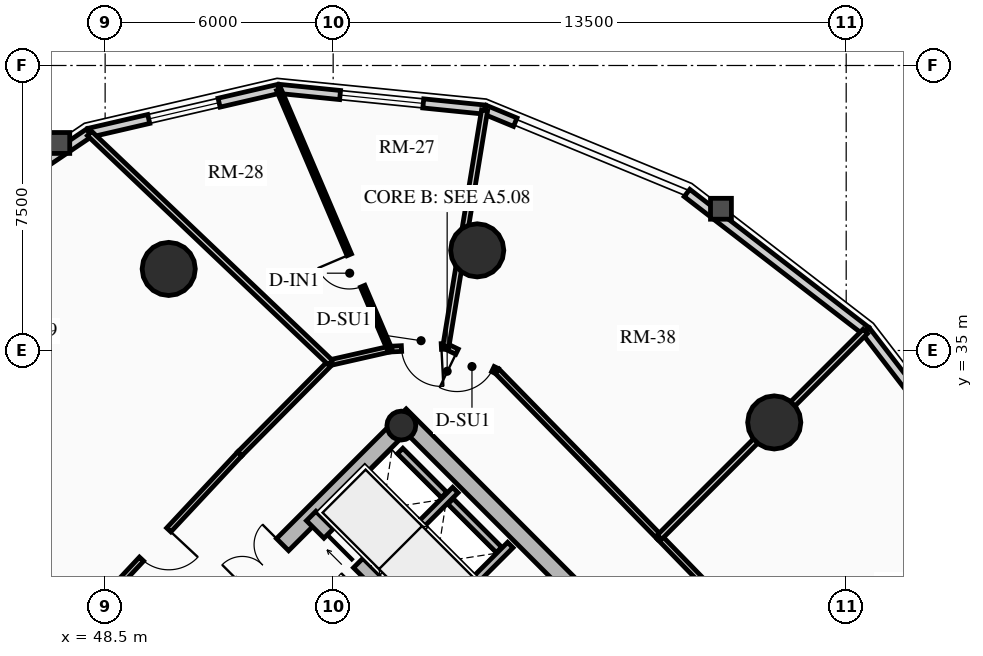
"""IFC4 building model, lengths in metres.
Left out: names, types, materials, properties, quantities, classifications, styles, units other than length and angle.
Written with IfcOpenShell. Run it as: python <this file> out.ifc"""

import sys

from ifc_helpers import new_model, si_unit, direction, frame, frame_2d, origin, origin_2d, place, context, subcontext, project, spatial, rectangle, circle, hollow_circle, extrude, source, transform, mapped, element, fill, save


model = new_model("IFC4")
c1 = context("Model", 3, precision=1e-05, world=origin(), true_north=direction((0.0, 1.0)))
c2 = subcontext(c1, "Body", "Model", "MODEL_VIEW")
j1 = project(units=[si_unit("LENGTHUNIT", "METRE"), si_unit("PLANEANGLEUNIT", "RADIAN")], contexts=[c1])
p1 = place(None, origin())
s1 = spatial("IfcSite", under=j1, at=p1, CompositionType="ELEMENT")
p2 = place(p1, origin())
s2 = spatial("IfcBuilding", under=s1, at=p2, CompositionType="ELEMENT")
p3 = place(p2, frame((0.0, 0.0, 81.79)))
s3 = spatial("IfcBuildingStorey", under=s2, at=p3, CompositionType="ELEMENT", Elevation=81.79)
p4 = place(p3, frame((66.303, 23.263, 0.0), z_axis=(0.0, 0.0, 1.0), x_axis=(-0.707106781187, 0.707106781187, 0.0)))
e1 = element("IfcWall", 1, at=p4, inside=s3, PredefinedType="SHEAR", context=c2, shape_type="SweptSolid", body=[
    extrude(rectangle(XDim=14.2, YDim=0.45, at=frame_2d((7.1, 0.0))), origin(), (0.0, 0.0, 1.0), 2.91),
])
p5 = place(p3, frame((48.856, 25.578, 0.0), z_axis=(0.0, 0.0, 1.0), x_axis=(0.707106781187, 0.707106781187, 0.0)))
e2 = element("IfcWall", 2, at=p5, inside=s3, PredefinedType="SHEAR", context=c2, shape_type="SweptSolid", body=[
    extrude(rectangle(XDim=10.7, YDim=0.45, at=frame_2d((5.35, 0.0))), origin(), (0.0, 0.0, 1.0), 2.91),
])
m1 = source(origin(), c2, "Body", "SweptSolid", [
    extrude(rectangle(XDim=1.5, YDim=2.02, at=frame_2d((0.75, 1.01))), frame((0.0, 0.235, 0.0), z_axis=(0.0, -1.0, 0.0), x_axis=(1.0, 0.0, 0.0)), (0.0, 0.0, 1.0), 0.47),
])
p6 = place(p5, frame((4.6, 0.0, 0.0)))
e3 = element("IfcOpeningElement", 3, at=p6, cuts=e2, PredefinedType="OPENING", context=c2, shape_type="MappedRepresentation", body=[
    mapped(m1, transform((0.0, 0.0, 0.0), x_axis=(1.0, 0.0, 0.0), y_axis=(0.0, 1.0, 0.0), z_axis=(0.0, 0.0, 1.0), scale=1.0)),
])
p7 = place(p3, frame((63.645, 20.922, 0.0), z_axis=(0.0, 0.0, 1.0), x_axis=(-0.707106781187, 0.707106781187, 0.0)))
e4 = element("IfcWall", 4, at=p7, inside=s3, PredefinedType="SHEAR", context=c2, shape_type="SweptSolid", body=[
    extrude(rectangle(XDim=13.75, YDim=0.35, at=frame_2d((6.875, 0.0))), origin(), (0.0, 0.0, 1.0), 2.91),
])
m2 = source(origin(), c2, "Body", "SweptSolid", [
    extrude(rectangle(XDim=1.1, YDim=2.015, at=frame_2d((0.55, 1.007))), frame((0.0, 0.185, 0.0), z_axis=(0.0, -1.0, 0.0), x_axis=(1.0, 0.0, 0.0)), (0.0, 0.0, 1.0), 0.37),
])
p8 = place(p7, frame((10.0, 0.0, 0.0)))
e5 = element("IfcOpeningElement", 5, at=p8, cuts=e4, PredefinedType="OPENING", context=c2, shape_type="MappedRepresentation", body=[
    mapped(m2, transform((0.0, 0.0, 0.0), x_axis=(1.0, 0.0, 0.0), y_axis=(0.0, 1.0, 0.0), z_axis=(0.0, 0.0, 1.0), scale=1.0)),
])
p9 = place(p7, frame((12.0, 0.0, 0.0)))
e6 = element("IfcOpeningElement", 6, at=p9, cuts=e4, PredefinedType="OPENING", context=c2, shape_type="MappedRepresentation", body=[
    mapped(m2, transform((0.0, 0.0, 0.0), x_axis=(1.0, 0.0, 0.0), y_axis=(0.0, 1.0, 0.0), z_axis=(0.0, 0.0, 1.0), scale=1.0)),
])
m3 = source(origin(), c2, "Body", "SweptSolid", [
    extrude(rectangle(XDim=1.15, YDim=2.02, at=frame_2d((0.575, 1.01))), frame((0.0, 0.185, 0.0), z_axis=(0.0, -1.0, 0.0), x_axis=(1.0, 0.0, 0.0)), (0.0, 0.0, 1.0), 0.37),
])
p10 = place(p7, frame((5.305, 0.0, 0.0)))
e7 = element("IfcOpeningElement", 7, at=p10, cuts=e4, PredefinedType="OPENING", context=c2, shape_type="MappedRepresentation", body=[
    mapped(m3, transform((0.0, 0.0, 0.0), x_axis=(1.0, 0.0, 0.0), y_axis=(0.0, 1.0, 0.0), z_axis=(0.0, 0.0, 1.0), scale=1.0)),
])
p11 = place(p3, frame((56.294, 33.024, 0.0), z_axis=(0.0, 0.0, 1.0), x_axis=(0.707106781187, 0.707106781187, 0.0)))
e8 = element("IfcColumn", 8, at=p11, inside=s3, PredefinedType="COLUMN", context=c2, shape_type="SweptSolid", body=[
    extrude(hollow_circle(Radius=0.38, WallThickness=0.032, at=origin_2d()), origin(), (0.0, 0.0, 1.0), 2.91),
])
for number, where, z_axis, x_axis in (
    (9, (66.107, 33.107, 0.0), (0.0, 0.0, 1.0), (1.0, 0.0, 0.0)),
    (10, (58.291, 37.635, 0.0), (0.0, 0.0, 1.0), (1.0, 0.0, 0.0)),
    (11, (50.173, 37.146, 0.0), (0.0, 0.0, 1.0), (1.0, 0.0, 0.0)),
):
    element("IfcColumn", number, at=place(p3, frame(where, z_axis=z_axis, x_axis=x_axis)), inside=s3, PredefinedType="USERDEFINED", context=c2, shape_type="SweptSolid", body=[
        extrude(circle(Radius=0.7, at=origin_2d()), origin(), (0.0, 0.0, 1.0), 2.91),
    ])
p12 = place(p3, frame((63.811, 39.145, 0.0), z_axis=(0.0, 0.0, 1.0), x_axis=(0.791982052206, -0.61054437102, 0.0)))
e12 = element("IfcWall", 12, at=p12, inside=s3, PredefinedType="SOLIDWALL", context=c2, shape_type="SweptSolid", body=[
    extrude(rectangle(XDim=5.942, YDim=0.24, at=frame_2d((2.971, 0.0))), origin(), (0.0, 0.0, 1.0), 2.179),
])
p13 = place(p3, frame((58.487, 41.339, 0.0), z_axis=(0.0, 0.0, 1.0), x_axis=(0.924556017656, -0.381046152345, 0.0)))
e13 = element("IfcWall", 13, at=p13, inside=s3, PredefinedType="SOLIDWALL", context=c2, shape_type="SweptSolid", body=[
    extrude(rectangle(XDim=0.87, YDim=0.24, at=frame_2d((0.435, 0.0))), origin(), (0.0, 0.0, 1.0), 2.179),
])
p14 = place(p3, frame((53.067, 41.885, 0.0), z_axis=(0.0, 0.0, 1.0), x_axis=(0.994971754311, -0.10015591906, 0.0)))
e14 = element("IfcWall", 14, at=p14, inside=s3, PredefinedType="SOLIDWALL", context=c2, shape_type="SweptSolid", body=[
    extrude(rectangle(XDim=5.448, YDim=0.24, at=frame_2d((2.724, 0.0))), origin(), (0.0, 0.0, 1.0), 2.179),
])
m4 = source(origin(), c2, "Body", "SweptSolid", [
    extrude(rectangle(XDim=2.2, YDim=1.35, at=frame_2d((1.1, 0.675))), frame((0.0, 0.13, 0.0), z_axis=(0.0, -1.0, 0.0), x_axis=(1.0, 0.0, 0.0)), (0.0, 0.0, 1.0), 0.26),
])
p15 = place(p14, frame((1.624, 0.0, 0.65)))
e15 = element("IfcOpeningElement", 15, at=p15, cuts=e14, PredefinedType="OPENING", context=c2, shape_type="MappedRepresentation", body=[
    mapped(m4, transform((0.0, 0.0, 0.0), x_axis=(1.0, 0.0, 0.0), y_axis=(0.0, 1.0, 0.0), z_axis=(0.0, 0.0, 1.0), scale=1.0)),
])
p16 = place(p3, frame((48.08, 40.729, 0.0), z_axis=(0.0, 0.0, 1.0), x_axis=(0.974165631126, 0.225834725257, 0.0)))
e16 = element("IfcWall", 16, at=p16, inside=s3, PredefinedType="SOLIDWALL", context=c2, shape_type="SweptSolid", body=[
    extrude(rectangle(XDim=5.119, YDim=0.24, at=frame_2d((2.56, 0.0))), origin(), (0.0, 0.0, 1.0), 2.179),
])
m5 = source(origin(), c2, "Body", "SweptSolid", [
    extrude(rectangle(XDim=1.9, YDim=1.35, at=frame_2d((0.95, 0.675))), frame((0.0, 0.13, 0.0), z_axis=(0.0, -1.0, 0.0), x_axis=(1.0, 0.0, 0.0)), (0.0, 0.0, 1.0), 0.26),
])
p17 = place(p16, frame((1.609, 0.0, 0.65)))
e17 = element("IfcOpeningElement", 17, at=p17, cuts=e16, PredefinedType="OPENING", context=c2, shape_type="MappedRepresentation", body=[
    mapped(m5, transform((0.0, 0.0, 0.0), x_axis=(1.0, 0.0, 0.0), y_axis=(0.0, 1.0, 0.0), z_axis=(0.0, 0.0, 1.0), scale=1.0)),
])
p18 = place(p3, frame((44.015, 37.985, 0.0), z_axis=(0.0, 0.0, 1.0), x_axis=(0.828781148131, 0.559572880421, 0.0)))
e18 = element("IfcWall", 18, at=p18, inside=s3, PredefinedType="SOLIDWALL", context=c2, shape_type="SweptSolid", body=[
    extrude(rectangle(XDim=4.905, YDim=0.24, at=frame_2d((2.452, 0.0))), origin(), (0.0, 0.0, 1.0), 2.179),
])
p19 = place(p3, frame((68.517, 35.517, 0.0), z_axis=(0.0, 0.0, 1.0), x_axis=(0.61054437102, -0.791982052206, 0.0)))
e19 = element("IfcWall", 19, at=p19, inside=s3, PredefinedType="SOLIDWALL", context=c2, shape_type="SweptSolid", body=[
    extrude(rectangle(XDim=5.942, YDim=0.24, at=frame_2d((2.971, 0.0))), origin(), (0.0, 0.0, 1.0), 2.179),
])
p20 = place(p19, frame((2.021, 0.0, 0.65)))
e20 = element("IfcOpeningElement", 20, at=p20, cuts=e19, PredefinedType="OPENING", context=c2, shape_type="MappedRepresentation", body=[
    mapped(m5, transform((0.0, 0.0, 0.0), x_axis=(1.0, 0.0, 0.0), y_axis=(0.0, 1.0, 0.0), z_axis=(0.0, 0.0, 1.0), scale=1.0)),
])
p21 = place(p3, frame((57.062, 27.781, 0.0), z_axis=(0.0, 0.0, 1.0), x_axis=(0.707106781187, 0.707106781187, 0.0)))
e21 = element("IfcWall", 21, at=p21, inside=s3, PredefinedType="SHEAR", context=c2, shape_type="SweptSolid", body=[
    extrude(rectangle(XDim=2.97, YDim=0.2, at=frame_2d((1.485, 0.0))), origin(), (0.0, 0.0, 1.0), 2.91),
])
p22 = place(p3, frame((55.615, 29.227, 0.0), z_axis=(0.0, 0.0, 1.0), x_axis=(0.707147878904, 0.70706568108, 0.0)))
e22 = element("IfcWall", 22, at=p22, inside=s3, PredefinedType="SHEAR", context=c2, shape_type="SweptSolid", body=[
    extrude(rectangle(XDim=2.97, YDim=0.2, at=frame_2d((1.485, 0.0))), origin(), (0.0, 0.0, 1.0), 2.91),
])
p23 = place(p3, frame((58.865, 29.754, 0.0), z_axis=(0.0, 0.0, 1.0), x_axis=(-0.707174411312, 0.707039144592, 0.0)))
e23 = element("IfcWall", 23, at=p23, inside=s3, PredefinedType="SHEAR", context=c2, shape_type="SweptSolid", body=[
    extrude(rectangle(XDim=1.805, YDim=0.2, at=frame_2d((0.902, 0.0))), origin(), (0.0, 0.0, 1.0), 2.91),
])
p24 = place(p3, frame((57.419, 31.2, 0.0), z_axis=(0.0, 0.0, 1.0), x_axis=(-0.707032117043, 0.707181437447, 0.0)))
e24 = element("IfcWall", 24, at=p24, inside=s3, PredefinedType="SHEAR", context=c2, shape_type="SweptSolid", body=[
    extrude(rectangle(XDim=1.635, YDim=0.2, at=frame_2d((0.817, 0.0))), origin(), (0.0, 0.0, 1.0), 2.91),
])
p25 = place(p3, frame((63.086, 30.086, 0.0), z_axis=(0.0, 0.0, 1.0), x_axis=(-0.699075897379, 0.715047473741, 0.0)))
e25 = element("IfcWall", 25, at=p25, inside=s3, PredefinedType="PARTITIONING", context=c2, shape_type="SweptSolid", body=[
    extrude(rectangle(XDim=6.114, YDim=0.15, at=frame_2d((3.057, 0.0))), origin(), (0.0, 0.0, 1.0), 2.225),
])
p26 = place(p3, frame((58.812, 34.458, 0.0), z_axis=(0.0, 0.0, 1.0), x_axis=(-0.899559490277, 0.436798264021, 0.0)))
e26 = element("IfcWall", 26, at=p26, inside=s3, PredefinedType="PARTITIONING", context=c2, shape_type="SweptSolid", body=[
    extrude(rectangle(XDim=1.495, YDim=0.15, at=frame_2d((0.748, 0.0))), origin(), (0.0, 0.0, 1.0), 2.225),
])
m6 = source(origin(), c2, "Body", "SweptSolid", [
    extrude(rectangle(XDim=1.05, YDim=2.015, at=frame_2d((0.525, 1.007))), frame((0.0, 0.085, 0.0), z_axis=(0.0, -1.0, 0.0), x_axis=(1.0, 0.0, 0.0)), (0.0, 0.0, 1.0), 0.17),
])
p27 = place(p26, frame((0.12, 0.0, 0.0)))
e27 = element("IfcOpeningElement", 27, at=p27, cuts=e26, PredefinedType="OPENING", context=c2, shape_type="MappedRepresentation", body=[
    mapped(m6, transform((0.0, 0.0, 0.0), x_axis=(1.0, 0.0, 0.0), y_axis=(0.0, 1.0, 0.0), z_axis=(0.0, 0.0, 1.0), scale=1.0)),
])
p28 = place(p3, frame((57.467, 35.111, 0.0), z_axis=(0.0, 0.0, 1.0), x_axis=(-0.998691757323, -0.051134859488, 0.0)))
e28 = element("IfcWall", 28, at=p28, inside=s3, PredefinedType="PARTITIONING", context=c2, shape_type="SweptSolid", body=[
    extrude(rectangle(XDim=1.485, YDim=0.15, at=frame_2d((0.742, 0.0))), origin(), (0.0, 0.0, 1.0), 2.225),
])
p29 = place(p28, frame((0.12, 0.0, 0.0)))
e29 = element("IfcOpeningElement", 29, at=p29, cuts=e28, PredefinedType="OPENING", context=c2, shape_type="MappedRepresentation", body=[
    mapped(m6, transform((0.0, 0.0, 0.0), x_axis=(1.0, 0.0, 0.0), y_axis=(0.0, 1.0, 0.0), z_axis=(0.0, 0.0, 1.0), scale=1.0)),
])
p30 = place(p3, frame((55.984, 35.035, 0.0), z_axis=(0.0, 0.0, 1.0), x_axis=(-0.975290305708, -0.22092718165, 0.0)))
e30 = element("IfcWall", 30, at=p30, inside=s3, PredefinedType="PARTITIONING", context=c2, shape_type="SweptSolid", body=[
    extrude(rectangle(XDim=1.597, YDim=0.15, at=frame_2d((0.798, 0.0))), origin(), (0.0, 0.0, 1.0), 2.225),
])
p31 = place(p3, frame((54.427, 34.683, 0.0), z_axis=(0.0, 0.0, 1.0), x_axis=(-0.704178989986, -0.710022499687, 0.0)))
e31 = element("IfcWall", 31, at=p31, inside=s3, PredefinedType="PARTITIONING", context=c2, shape_type="SweptSolid", body=[
    extrude(rectangle(XDim=3.384, YDim=0.15, at=frame_2d((1.692, 0.0))), origin(), (0.0, 0.0, 1.0), 2.225),
])
p32 = place(p3, frame((52.043, 32.28, 0.0), z_axis=(0.0, 0.0, 1.0), x_axis=(-0.682606081633, -0.730786519661, 0.0)))
e32 = element("IfcWall", 32, at=p32, inside=s3, PredefinedType="PARTITIONING", context=c2, shape_type="SweptSolid", body=[
    extrude(rectangle(XDim=6.527, YDim=0.15, at=frame_2d((3.263, 0.0))), origin(), (0.0, 0.0, 1.0), 2.225),
])
p33 = place(p32, frame((2.738, 0.0, 0.0)))
e33 = element("IfcOpeningElement", 33, at=p33, cuts=e32, PredefinedType="OPENING", context=c2, shape_type="MappedRepresentation", body=[
    mapped(m6, transform((0.0, 0.0, 0.0), x_axis=(1.0, 0.0, 0.0), y_axis=(0.0, 1.0, 0.0), z_axis=(0.0, 0.0, 1.0), scale=1.0)),
])
p34 = place(p3, frame((67.27, 25.78, 0.0), z_axis=(0.0, 0.0, 1.0), x_axis=(-0.696847842907, 0.717218992942, 0.0)))
e34 = element("IfcWall", 34, at=p34, inside=s3, PredefinedType="PARTITIONING", context=c2, shape_type="SweptSolid", body=[
    extrude(rectangle(XDim=6.004, YDim=0.15, at=frame_2d((3.002, 0.0))), origin(), (0.0, 0.0, 1.0), 2.655),
])
m7 = source(origin(), c2, "Body", "SweptSolid", [
    extrude(rectangle(XDim=1.0, YDim=2.015, at=frame_2d((0.5, 1.007))), frame((0.0, 0.085, 0.0), z_axis=(0.0, -1.0, 0.0), x_axis=(1.0, 0.0, 0.0)), (0.0, 0.0, 1.0), 0.17),
])
p35 = place(p34, frame((2.502, 0.0, 0.0)))
e35 = element("IfcOpeningElement", 35, at=p35, cuts=e34, PredefinedType="OPENING", context=c2, shape_type="MappedRepresentation", body=[
    mapped(m7, transform((0.0, 0.0, 0.0), x_axis=(1.0, 0.0, 0.0), y_axis=(0.0, 1.0, 0.0), z_axis=(0.0, 0.0, 1.0), scale=1.0)),
])
p36 = place(p3, frame((63.086, 30.086, 0.0), z_axis=(0.0, 0.0, 1.0), x_axis=(0.707106781187, 0.707106781187, 0.0)))
e36 = element("IfcWall", 36, at=p36, inside=s3, PredefinedType="PARTITIONING", context=c2, shape_type="SweptSolid", body=[
    extrude(rectangle(XDim=7.661, YDim=0.16, at=frame_2d((3.831, 0.0))), origin(), (0.0, 0.0, 1.0), 2.179),
])
p37 = place(p3, frame((57.467, 35.111, 0.0), z_axis=(0.0, 0.0, 1.0), x_axis=(0.161711214096, 0.98683812413, 0.0)))
e37 = element("IfcWall", 37, at=p37, inside=s3, PredefinedType="PARTITIONING", context=c2, shape_type="SweptSolid", body=[
    extrude(rectangle(XDim=6.291, YDim=0.16, at=frame_2d((3.146, 0.0))), origin(), (0.0, 0.0, 1.0), 2.179),
])
p38 = place(p3, frame((54.427, 34.683, 0.0), z_axis=(0.0, 0.0, 1.0), x_axis=(-0.72454072322, 0.689231993161, 0.0)))
e38 = element("IfcWall", 38, at=p38, inside=s3, PredefinedType="PARTITIONING", context=c2, shape_type="SweptSolid", body=[
    extrude(rectangle(XDim=8.747, YDim=0.16, at=frame_2d((4.374, 0.0))), origin(), (0.0, 0.0, 1.0), 2.179),
])
p39 = place(p3, frame((47.588, 27.51, 0.0), z_axis=(0.0, 0.0, 1.0), x_axis=(-0.701457073903, 0.712711704318, 0.0)))
e39 = element("IfcWall", 39, at=p39, inside=s3, PredefinedType="PARTITIONING", context=c2, shape_type="SweptSolid", body=[
    extrude(rectangle(XDim=8.981, YDim=0.16, at=frame_2d((4.49, 0.0))), origin(), (0.0, 0.0, 1.0), 2.179),
])
p40 = place(p3, frame((55.984, 35.035, 0.0), z_axis=(0.0, 0.0, 1.0), x_axis=(-0.392438685048, 0.919778168081, 0.0)))
e40 = element("IfcWall", 40, at=p40, inside=s3, PredefinedType="PARTITIONING", context=c2, shape_type="SweptSolid", body=[
    extrude(rectangle(XDim=7.426, YDim=0.125, at=frame_2d((3.713, 0.0))), origin(), (0.0, 0.0, 1.0), 2.179),
])
m8 = source(origin(), c2, "Body", "SweptSolid", [
    extrude(rectangle(XDim=0.9, YDim=2.005, at=frame_2d((0.45, 1.002))), frame((0.0, 0.073, 0.0), z_axis=(0.0, -1.0, 0.0), x_axis=(1.0, 0.0, 0.0)), (0.0, 0.0, 1.0), 0.145),
])
p41 = place(p40, frame((1.8, 0.0, 0.0)))
e41 = element("IfcOpeningElement", 41, at=p41, cuts=e40, PredefinedType="OPENING", context=c2, shape_type="MappedRepresentation", body=[
    mapped(m8, transform((0.0, 0.0, 0.0), x_axis=(1.0, 0.0, 0.0), y_axis=(0.0, 1.0, 0.0), z_axis=(0.0, 0.0, 1.0), scale=1.0)),
])
m9 = source(origin(), c2, "Body", "SweptSolid", [
    extrude(rectangle(XDim=2.2, YDim=1.35, at=frame_2d((1.1, 0.675))), frame((0.0, 0.03, 0.0), z_axis=(0.0, -1.0, 0.0), x_axis=(1.0, 0.0, 0.0)), (0.0, 0.0, 1.0), 0.06),
])
p42 = place(p15, origin())
e42 = element("IfcWindow", 42, at=p42, inside=s3, PartitioningType="DOUBLE_PANEL_VERTICAL", PredefinedType="WINDOW", context=c2, shape_type="MappedRepresentation", body=[
    mapped(m9, transform((0.0, 0.0, 0.0), x_axis=(1.0, 0.0, 0.0), y_axis=(0.0, 1.0, 0.0), z_axis=(0.0, 0.0, 1.0), scale=1.0)),
])
fill(e15, e42)
m10 = source(origin(), c2, "Body", "SweptSolid", [
    extrude(rectangle(XDim=1.9, YDim=1.35, at=frame_2d((0.95, 0.675))), frame((0.0, 0.03, 0.0), z_axis=(0.0, -1.0, 0.0), x_axis=(1.0, 0.0, 0.0)), (0.0, 0.0, 1.0), 0.06),
])
p43 = place(p17, origin())
e43 = element("IfcWindow", 43, at=p43, inside=s3, PartitioningType="DOUBLE_PANEL_VERTICAL", PredefinedType="WINDOW", context=c2, shape_type="MappedRepresentation", body=[
    mapped(m10, transform((0.0, 0.0, 0.0), x_axis=(1.0, 0.0, 0.0), y_axis=(0.0, 1.0, 0.0), z_axis=(0.0, 0.0, 1.0), scale=1.0)),
])
fill(e17, e43)
m11 = source(origin(), c2, "Body", "SweptSolid", [
    extrude(rectangle(XDim=1.1, YDim=2.015, at=frame_2d((0.55, 1.007))), frame((0.0, 0.025, 0.0), z_axis=(0.0, -1.0, 0.0), x_axis=(1.0, 0.0, 0.0)), (0.0, 0.0, 1.0), 0.05),
])
p44 = place(p9, origin())
e44 = element("IfcDoor", 44, at=p44, inside=s3, OperationType="SLIDING_TO_RIGHT", PredefinedType="DOOR", context=c2, shape_type="MappedRepresentation", body=[
    mapped(m11, transform((0.0, 0.0, 0.0), x_axis=(1.0, 0.0, 0.0), y_axis=(0.0, 1.0, 0.0), z_axis=(0.0, 0.0, 1.0), scale=1.0)),
])
fill(e6, e44)
m12 = source(origin(), c2, "Body", "SweptSolid", [
    extrude(rectangle(XDim=1.5, YDim=2.02, at=frame_2d((0.75, 1.01))), frame((0.0, 0.025, 0.0), z_axis=(0.0, -1.0, 0.0), x_axis=(1.0, 0.0, 0.0)), (0.0, 0.0, 1.0), 0.05),
])
p45 = place(p6, origin())
e45 = element("IfcDoor", 45, at=p45, inside=s3, OperationType="DOUBLE_DOOR_SINGLE_SWING", PredefinedType="DOOR", context=c2, shape_type="MappedRepresentation", body=[
    mapped(m12, transform((0.0, 0.0, 0.0), x_axis=(1.0, 0.0, 0.0), y_axis=(0.0, 1.0, 0.0), z_axis=(0.0, 0.0, 1.0), scale=1.0)),
])
fill(e3, e45)
m13 = source(origin(), c2, "Body", "SweptSolid", [
    extrude(rectangle(XDim=1.05, YDim=2.015, at=frame_2d((0.525, 1.007))), frame((0.0, 0.025, 0.0), z_axis=(0.0, -1.0, 0.0), x_axis=(1.0, 0.0, 0.0)), (0.0, 0.0, 1.0), 0.05),
])
p46 = place(p29, origin())
e46 = element("IfcDoor", 46, at=p46, inside=s3, OperationType="SINGLE_SWING_LEFT", PredefinedType="DOOR", context=c2, shape_type="MappedRepresentation", body=[
    mapped(m13, transform((0.0, 0.0, 0.0), x_axis=(1.0, 0.0, 0.0), y_axis=(0.0, 1.0, 0.0), z_axis=(0.0, 0.0, 1.0), scale=1.0)),
])
fill(e29, e46)
m14 = source(origin(), c2, "Body", "SweptSolid", [
    extrude(rectangle(XDim=0.9, YDim=2.005, at=frame_2d((0.45, 1.002))), frame((0.0, 0.025, 0.0), z_axis=(0.0, -1.0, 0.0), x_axis=(1.0, 0.0, 0.0)), (0.0, 0.0, 1.0), 0.05),
])
p47 = place(p41, origin())
e47 = element("IfcDoor", 47, at=p47, inside=s3, OperationType="SINGLE_SWING_RIGHT", PredefinedType="DOOR", context=c2, shape_type="MappedRepresentation", body=[
    mapped(m14, transform((0.0, 0.0, 0.0), x_axis=(1.0, 0.0, 0.0), y_axis=(0.0, 1.0, 0.0), z_axis=(0.0, 0.0, 1.0), scale=1.0)),
])
fill(e41, e47)
p48 = place(p33, origin())
e48 = element("IfcDoor", 48, at=p48, inside=s3, OperationType="SINGLE_SWING_LEFT", PredefinedType="DOOR", context=c2, shape_type="MappedRepresentation", body=[
    mapped(m13, transform((0.0, 0.0, 0.0), x_axis=(1.0, 0.0, 0.0), y_axis=(0.0, 1.0, 0.0), z_axis=(0.0, 0.0, 1.0), scale=1.0)),
])
fill(e33, e48)
p49 = place(p27, origin())
e49 = element("IfcDoor", 49, at=p49, inside=s3, OperationType="SINGLE_SWING_RIGHT", PredefinedType="DOOR", context=c2, shape_type="MappedRepresentation", body=[
    mapped(m13, transform((0.0, 0.0, 0.0), x_axis=(1.0, 0.0, 0.0), y_axis=(0.0, 1.0, 0.0), z_axis=(0.0, 0.0, 1.0), scale=1.0)),
])
fill(e27, e49)
save(model, sys.argv[1])
